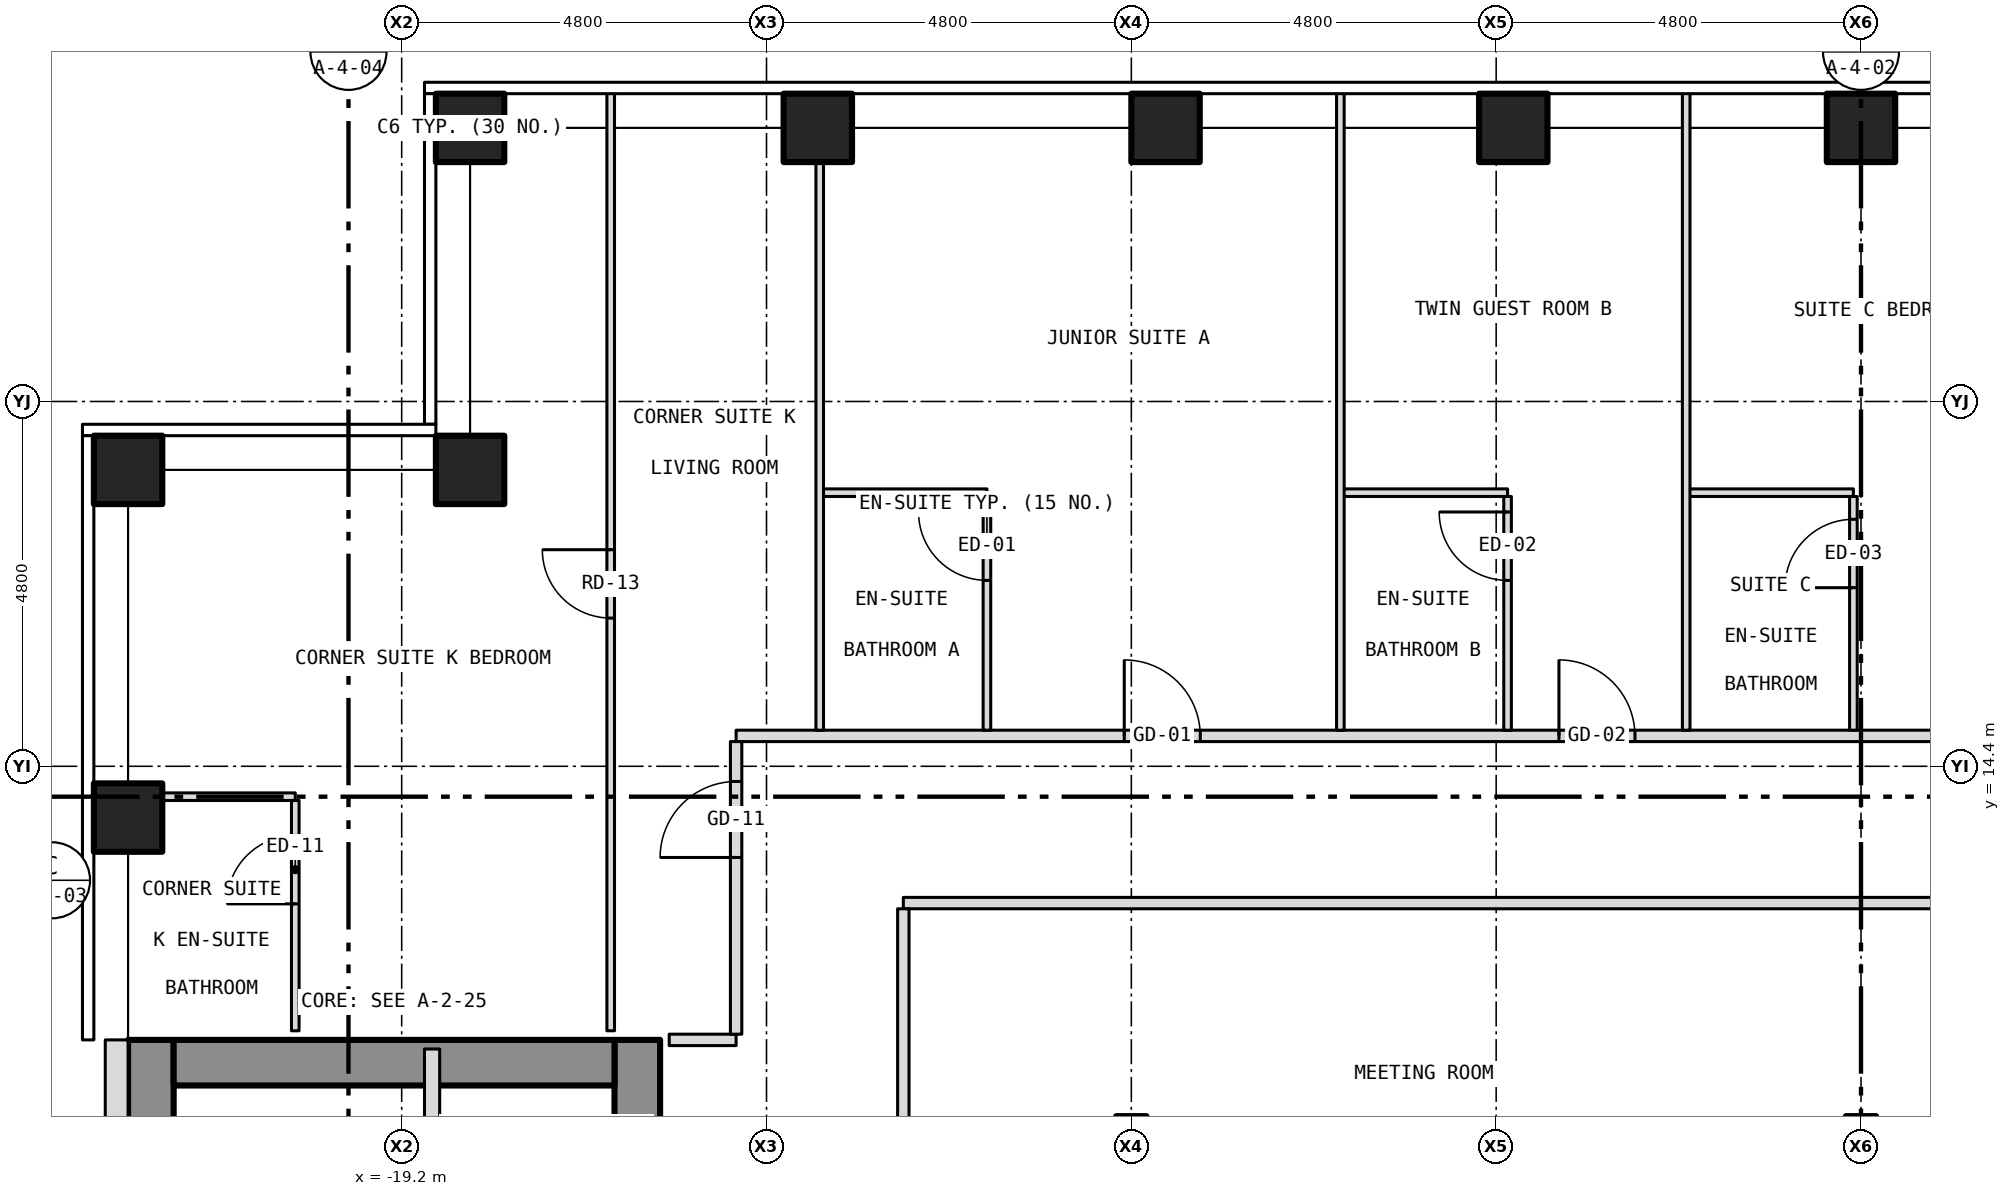
"""IFC4 building model, lengths in metres.
Left out: names, types, materials, properties, quantities, classifications, styles, units other than length and angle.
Written with IfcOpenShell. Run it as: python <this file> out.ifc"""

import sys

from ifc_helpers import new_model, si_unit, direction, frame, frame_2d, origin, origin_2d, place, context, subcontext, project, spatial, rectangle, hollow_rectangle, extrude, element, fill, save


model = new_model("IFC4")
c1 = context("Model", 3, precision=1e-05, world=origin(), true_north=direction((0.0, 1.0)))
c2 = subcontext(c1, "Body", "Model", "MODEL_VIEW")
j1 = project(units=[si_unit("LENGTHUNIT", "METRE"), si_unit("PLANEANGLEUNIT", "RADIAN")], contexts=[c1])
p1 = place(None, origin())
s1 = spatial("IfcSite", under=j1, at=p1, CompositionType="ELEMENT")
p2 = place(p1, origin())
s2 = spatial("IfcBuilding", under=s1, at=p2, CompositionType="ELEMENT")
p3 = place(p2, frame((0.0, 0.0, 92.5)))
s3 = spatial("IfcBuildingStorey", under=s2, at=p3, CompositionType="ELEMENT", Elevation=92.5)
for number, where, z_axis, x_axis in (
    (1, (-18.3, 22.8, -0.15), (0.0, 0.0, 1.0), (1.0, 0.0, 0.0)),
    (2, (-13.725, 22.8, -0.15), (0.0, 0.0, 1.0), (1.0, 0.0, 0.0)),
    (3, (-9.15, 22.8, -0.15), (0.0, 0.0, 1.0), (1.0, 0.0, 0.0)),
    (4, (-4.575, 22.8, -0.15), (0.0, 0.0, 1.0), (1.0, 0.0, 0.0)),
    (5, (0.0, 22.8, -0.15), (0.0, 0.0, 1.0), (1.0, 0.0, 0.0)),
    (6, (-22.8, 13.725, -0.15), (0.0, 0.0, 1.0), (1.0, 0.0, 0.0)),
    (7, (-22.8, 18.3, -0.15), (0.0, 0.0, 1.0), (1.0, 0.0, 0.0)),
    (8, (-18.3, 18.3, -0.15), (0.0, 0.0, 1.0), (1.0, 0.0, 0.0)),
):
    element("IfcColumn", number, at=place(p3, frame(where, z_axis=z_axis, x_axis=x_axis)), inside=s3, PredefinedType="COLUMN", context=c2, shape_type="SweptSolid", body=[
        extrude(hollow_rectangle(XDim=0.9, YDim=0.9, WallThickness=0.05, at=origin_2d()), origin(), (0.0, 0.0, 1.0), 3.5),
    ])
p4 = place(p3, frame((-16.1, -10.8, 0.0), z_axis=(0.0, 0.0, 1.0), x_axis=(0.0, 1.0, 0.0)))
e9 = element("IfcWall", 9, at=p4, inside=s3, PredefinedType="SHEAR", context=c2, shape_type="SweptSolid", body=[
    extrude(rectangle(XDim=21.6, YDim=0.6, at=frame_2d((10.8, 0.0))), origin(), (0.0, 0.0, 1.0), 3.25),
])
p5 = place(p4, frame((9.4, 0.0, 0.0)))
e10 = element("IfcOpeningElement", 10, at=p5, cuts=e9, PredefinedType="OPENING", context=c2, shape_type="SweptSolid", body=[
    extrude(rectangle(XDim=1.1, YDim=2.1, at=frame_2d((0.55, 1.05))), frame((0.0, 0.312, 0.0), z_axis=(0.0, -1.0, 0.0), x_axis=(1.0, 0.0, 0.0)), (0.0, 0.0, 1.0), 0.624),
])
p6 = place(p4, frame((11.5, 0.0, 0.0)))
e11 = element("IfcOpeningElement", 11, at=p6, cuts=e9, PredefinedType="OPENING", context=c2, shape_type="SweptSolid", body=[
    extrude(rectangle(XDim=1.1, YDim=2.1, at=frame_2d((0.55, 1.05))), frame((0.0, 0.312, 0.0), z_axis=(0.0, -1.0, 0.0), x_axis=(1.0, 0.0, 0.0)), (0.0, 0.0, 1.0), 0.624),
])
p7 = place(p4, frame((13.6, 0.0, 0.0)))
e12 = element("IfcOpeningElement", 12, at=p7, cuts=e9, PredefinedType="OPENING", context=c2, shape_type="SweptSolid", body=[
    extrude(rectangle(XDim=1.1, YDim=2.1, at=frame_2d((0.55, 1.05))), frame((0.0, 0.312, 0.0), z_axis=(0.0, -1.0, 0.0), x_axis=(1.0, 0.0, 0.0)), (0.0, 0.0, 1.0), 0.624),
])
p8 = place(p4, frame((15.7, 0.0, 0.0)))
e13 = element("IfcOpeningElement", 13, at=p8, cuts=e9, PredefinedType="OPENING", context=c2, shape_type="SweptSolid", body=[
    extrude(rectangle(XDim=1.1, YDim=2.1, at=frame_2d((0.55, 1.05))), frame((0.0, 0.312, 0.0), z_axis=(0.0, -1.0, 0.0), x_axis=(1.0, 0.0, 0.0)), (0.0, 0.0, 1.0), 0.624),
])
p9 = place(p4, frame((17.8, 0.0, 0.0)))
e14 = element("IfcOpeningElement", 14, at=p9, cuts=e9, PredefinedType="OPENING", context=c2, shape_type="SweptSolid", body=[
    extrude(rectangle(XDim=1.1, YDim=2.1, at=frame_2d((0.55, 1.05))), frame((0.0, 0.312, 0.0), z_axis=(0.0, -1.0, 0.0), x_axis=(1.0, 0.0, 0.0)), (0.0, 0.0, 1.0), 0.624),
])
p10 = place(p4, frame((0.758, 0.0, 0.0)))
e15 = element("IfcOpeningElement", 15, at=p10, cuts=e9, PredefinedType="OPENING", context=c2, shape_type="SweptSolid", body=[
    extrude(rectangle(XDim=1.1, YDim=2.1, at=frame_2d((0.55, 1.05))), frame((0.0, 0.312, 0.0), z_axis=(0.0, -1.0, 0.0), x_axis=(1.0, 0.0, 0.0)), (0.0, 0.0, 1.0), 0.624),
])
p11 = place(p4, frame((7.5, 0.0, 0.0)))
e16 = element("IfcOpeningElement", 16, at=p11, cuts=e9, PredefinedType="OPENING", context=c2, shape_type="SweptSolid", body=[
    extrude(rectangle(XDim=1.1, YDim=2.1, at=frame_2d((0.55, 1.05))), frame((0.0, 0.312, 0.0), z_axis=(0.0, -1.0, 0.0), x_axis=(1.0, 0.0, 0.0)), (0.0, 0.0, 1.0), 0.624),
])
p12 = place(p3, frame((-22.5, -10.8, 0.0), z_axis=(0.0, 0.0, 1.0), x_axis=(0.0, 1.0, 0.0)))
e17 = element("IfcWall", 17, at=p12, inside=s3, PredefinedType="SHEAR", context=c2, shape_type="SweptSolid", body=[
    extrude(rectangle(XDim=21.6, YDim=0.6, at=frame_2d((10.8, 0.0))), origin(), (0.0, 0.0, 1.0), 3.25),
])
p13 = place(p3, frame((-22.2, 10.5, 0.0), z_axis=(0.0, 0.0, 1.0), x_axis=(1.0, 0.0, 0.0)))
e18 = element("IfcWall", 18, at=p13, inside=s3, PredefinedType="SHEAR", context=c2, shape_type="SweptSolid", body=[
    extrude(rectangle(XDim=5.8, YDim=0.6, at=frame_2d((2.9, 0.0))), origin(), (0.0, 0.0, 1.0), 3.25),
])
p14 = place(p3, frame((-22.95, 10.8, 0.0), z_axis=(0.0, 0.0, 1.0), x_axis=(0.0, -1.0, 0.0)))
e19 = element("IfcWall", 19, at=p14, inside=s3, PredefinedType="SOLIDWALL", context=c2, shape_type="SweptSolid", body=[
    extrude(rectangle(XDim=21.6, YDim=0.3, at=frame_2d((10.8, 0.0))), origin(), (0.0, 0.0, 1.0), 3.5),
])
p15 = place(p14, frame((18.05, 0.0, 1.0)))
e20 = element("IfcOpeningElement", 20, at=p15, cuts=e19, PredefinedType="OPENING", context=c2, shape_type="SweptSolid", body=[
    extrude(rectangle(XDim=0.6, YDim=1.5, at=frame_2d((0.3, 0.75))), frame((0.0, 0.162, 0.0), z_axis=(0.0, -1.0, 0.0), x_axis=(1.0, 0.0, 0.0)), (0.0, 0.0, 1.0), 0.324),
])
p16 = place(p3, frame((-15.68, 10.8, 0.0), z_axis=(0.0, 0.0, 1.0), x_axis=(1.0, 0.0, 0.0)))
e21 = element("IfcWall", 21, at=p16, inside=s3, PredefinedType="PARTITIONING", context=c2, shape_type="SweptSolid", body=[
    extrude(rectangle(XDim=0.88, YDim=0.15, at=frame_2d((0.44, 0.0))), origin(), (0.0, 0.0, 1.0), 3.35),
])
p17 = place(p3, frame((-12.6, 12.6, 0.0), z_axis=(0.0, 0.0, 1.0), x_axis=(1.0, 0.0, 0.0)))
e22 = element("IfcWall", 22, at=p17, inside=s3, PredefinedType="PARTITIONING", context=c2, shape_type="SweptSolid", body=[
    extrude(rectangle(XDim=13.7, YDim=0.15, at=frame_2d((6.85, 0.0))), origin(), (0.0, 0.0, 1.0), 3.35),
])
p18 = place(p3, frame((-22.68, 14.0, 0.0), z_axis=(0.0, 0.0, 1.0), x_axis=(1.0, 0.0, 0.0)))
e23 = element("IfcWall", 23, at=p18, inside=s3, PredefinedType="PARTITIONING", context=c2, shape_type="SweptSolid", body=[
    extrude(rectangle(XDim=2.08, YDim=0.1, at=frame_2d((1.04, 0.0))), origin(), (0.0, 0.0, 1.0), 3.35),
])
p19 = place(p3, frame((-14.8, 14.8, 0.0), z_axis=(0.0, 0.0, 1.0), x_axis=(1.0, 0.0, 0.0)))
e24 = element("IfcWall", 24, at=p19, inside=s3, PredefinedType="PARTITIONING", context=c2, shape_type="SweptSolid", body=[
    extrude(rectangle(XDim=29.6, YDim=0.15, at=frame_2d((14.8, 0.0))), origin(), (0.0, 0.0, 1.0), 3.35),
])
p20 = place(p19, frame((5.107, 0.0, 0.0)))
e25 = element("IfcOpeningElement", 25, at=p20, cuts=e24, PredefinedType="OPENING", context=c2, shape_type="SweptSolid", body=[
    extrude(rectangle(XDim=1.0, YDim=2.1, at=frame_2d((0.5, 1.05))), frame((0.0, 0.087, 0.0), z_axis=(0.0, -1.0, 0.0), x_axis=(1.0, 0.0, 0.0)), (0.0, 0.0, 1.0), 0.174),
])
p21 = place(p19, frame((10.826, 0.0, 0.0)))
e26 = element("IfcOpeningElement", 26, at=p21, cuts=e24, PredefinedType="OPENING", context=c2, shape_type="SweptSolid", body=[
    extrude(rectangle(XDim=1.0, YDim=2.1, at=frame_2d((0.5, 1.05))), frame((0.0, 0.087, 0.0), z_axis=(0.0, -1.0, 0.0), x_axis=(1.0, 0.0, 0.0)), (0.0, 0.0, 1.0), 0.174),
])
p22 = place(p19, frame((19.104, 0.0, 0.0)))
e27 = element("IfcOpeningElement", 27, at=p22, cuts=e24, PredefinedType="OPENING", context=c2, shape_type="SweptSolid", body=[
    extrude(rectangle(XDim=1.0, YDim=2.1, at=frame_2d((0.5, 1.05))), frame((0.0, 0.087, 0.0), z_axis=(0.0, -1.0, 0.0), x_axis=(1.0, 0.0, 0.0)), (0.0, 0.0, 1.0), 0.174),
])
p23 = place(p19, frame((25.694, 0.0, 0.0)))
e28 = element("IfcOpeningElement", 28, at=p23, cuts=e24, PredefinedType="OPENING", context=c2, shape_type="SweptSolid", body=[
    extrude(rectangle(XDim=1.0, YDim=2.1, at=frame_2d((0.5, 1.05))), frame((0.0, 0.087, 0.0), z_axis=(0.0, -1.0, 0.0), x_axis=(1.0, 0.0, 0.0)), (0.0, 0.0, 1.0), 0.174),
])
p24 = place(p3, frame((-13.7, 18.0, 0.0), z_axis=(0.0, 0.0, 1.0), x_axis=(1.0, 0.0, 0.0)))
e29 = element("IfcWall", 29, at=p24, inside=s3, PredefinedType="PARTITIONING", context=c2, shape_type="SweptSolid", body=[
    extrude(rectangle(XDim=2.2, YDim=0.1, at=frame_2d((1.1, 0.0))), origin(), (0.0, 0.0, 1.0), 3.35),
])
p25 = place(p3, frame((-6.85, 18.0, 0.0), z_axis=(0.0, 0.0, 1.0), x_axis=(1.0, 0.0, 0.0)))
e30 = element("IfcWall", 30, at=p25, inside=s3, PredefinedType="PARTITIONING", context=c2, shape_type="SweptSolid", body=[
    extrude(rectangle(XDim=2.2, YDim=0.1, at=frame_2d((1.1, 0.0))), origin(), (0.0, 0.0, 1.0), 3.35),
])
p26 = place(p3, frame((-2.3, 18.0, 0.0), z_axis=(0.0, 0.0, 1.0), x_axis=(1.0, 0.0, 0.0)))
e31 = element("IfcWall", 31, at=p26, inside=s3, PredefinedType="PARTITIONING", context=c2, shape_type="SweptSolid", body=[
    extrude(rectangle(XDim=2.2, YDim=0.1, at=frame_2d((1.1, 0.0))), origin(), (0.0, 0.0, 1.0), 3.35),
])
p27 = place(p3, frame((-20.6, 10.92, 0.0), z_axis=(0.0, 0.0, 1.0), x_axis=(0.0, 1.0, 0.0)))
e32 = element("IfcWall", 32, at=p27, inside=s3, PredefinedType="PARTITIONING", context=c2, shape_type="SweptSolid", body=[
    extrude(rectangle(XDim=3.03, YDim=0.1, at=frame_2d((1.515, 0.0))), origin(), (0.0, 0.0, 1.0), 3.35),
])
p28 = place(p27, frame((1.67, 0.0, 0.0)))
e33 = element("IfcOpeningElement", 33, at=p28, cuts=e32, PredefinedType="OPENING", context=c2, shape_type="SweptSolid", body=[
    extrude(rectangle(XDim=0.9, YDim=2.1, at=frame_2d((0.45, 1.05))), frame((0.0, 0.062, 0.0), z_axis=(0.0, -1.0, 0.0), x_axis=(1.0, 0.0, 0.0)), (0.0, 0.0, 1.0), 0.124),
])
p29 = place(p3, frame((-18.8, 4.45, 0.0), z_axis=(0.0, 0.0, 1.0), x_axis=(0.0, 1.0, 0.0)))
e34 = element("IfcWall", 34, at=p29, inside=s3, PredefinedType="PARTITIONING", context=c2, shape_type="SweptSolid", body=[
    extrude(rectangle(XDim=6.23, YDim=0.2, at=frame_2d((3.115, 0.0))), origin(), (0.0, 0.0, 1.0), 3.25),
])
p30 = place(p3, frame((-16.45, 10.92, 0.0), z_axis=(0.0, 0.0, 1.0), x_axis=(0.0, 1.0, 0.0)))
e35 = element("IfcWall", 35, at=p30, inside=s3, PredefinedType="PARTITIONING", context=c2, shape_type="SweptSolid", body=[
    extrude(rectangle(XDim=12.36, YDim=0.1, at=frame_2d((6.18, 0.0))), origin(), (0.0, 0.0, 1.0), 3.35),
])
p31 = place(p30, frame((5.43, 0.0, 0.0)))
e36 = element("IfcOpeningElement", 36, at=p31, cuts=e35, PredefinedType="OPENING", context=c2, shape_type="SweptSolid", body=[
    extrude(rectangle(XDim=0.9, YDim=2.1, at=frame_2d((0.45, 1.05))), frame((0.0, 0.062, 0.0), z_axis=(0.0, -1.0, 0.0), x_axis=(1.0, 0.0, 0.0)), (0.0, 0.0, 1.0), 0.124),
])
p32 = place(p3, frame((-14.8, 10.875, 0.0), z_axis=(0.0, 0.0, 1.0), x_axis=(0.0, 1.0, 0.0)))
e37 = element("IfcWall", 37, at=p32, inside=s3, PredefinedType="PARTITIONING", context=c2, shape_type="SweptSolid", body=[
    extrude(rectangle(XDim=3.85, YDim=0.15, at=frame_2d((1.925, 0.0))), origin(), (0.0, 0.0, 1.0), 3.35),
])
p33 = place(p32, frame((2.325, 0.0, 0.0)))
e38 = element("IfcOpeningElement", 38, at=p33, cuts=e37, PredefinedType="OPENING", context=c2, shape_type="SweptSolid", body=[
    extrude(rectangle(XDim=1.0, YDim=2.1, at=frame_2d((0.5, 1.05))), frame((0.0, 0.087, 0.0), z_axis=(0.0, -1.0, 0.0), x_axis=(1.0, 0.0, 0.0)), (0.0, 0.0, 1.0), 0.174),
])
p34 = place(p3, frame((-13.7, 14.875, 0.0), z_axis=(0.0, 0.0, 1.0), x_axis=(0.0, 1.0, 0.0)))
e39 = element("IfcWall", 39, at=p34, inside=s3, PredefinedType="PARTITIONING", context=c2, shape_type="SweptSolid", body=[
    extrude(rectangle(XDim=7.805, YDim=0.1, at=frame_2d((3.902, 0.0))), origin(), (0.0, 0.0, 1.0), 3.35),
])
p35 = place(p3, frame((-12.6, 8.175, 0.0), z_axis=(0.0, 0.0, 1.0), x_axis=(0.0, 1.0, 0.0)))
e40 = element("IfcWall", 40, at=p35, inside=s3, PredefinedType="PARTITIONING", context=c2, shape_type="SweptSolid", body=[
    extrude(rectangle(XDim=4.35, YDim=0.15, at=frame_2d((2.175, 0.0))), origin(), (0.0, 0.0, 1.0), 3.35),
])
p36 = place(p3, frame((-11.5, 14.875, 0.0), z_axis=(0.0, 0.0, 1.0), x_axis=(0.0, 1.0, 0.0)))
e41 = element("IfcWall", 41, at=p36, inside=s3, PredefinedType="PARTITIONING", context=c2, shape_type="SweptSolid", body=[
    extrude(rectangle(XDim=3.075, YDim=0.1, at=frame_2d((1.538, 0.0))), origin(), (0.0, 0.0, 1.0), 3.35),
])
p37 = place(p36, frame((1.971, 0.0, 0.0)))
e42 = element("IfcOpeningElement", 42, at=p37, cuts=e41, PredefinedType="OPENING", context=c2, shape_type="SweptSolid", body=[
    extrude(rectangle(XDim=0.9, YDim=2.1, at=frame_2d((0.45, 1.05))), frame((0.0, 0.062, 0.0), z_axis=(0.0, -1.0, 0.0), x_axis=(1.0, 0.0, 0.0)), (0.0, 0.0, 1.0), 0.124),
])
p38 = place(p3, frame((-6.85, 14.875, 0.0), z_axis=(0.0, 0.0, 1.0), x_axis=(0.0, 1.0, 0.0)))
e43 = element("IfcWall", 43, at=p38, inside=s3, PredefinedType="PARTITIONING", context=c2, shape_type="SweptSolid", body=[
    extrude(rectangle(XDim=8.405, YDim=0.1, at=frame_2d((4.203, 0.0))), origin(), (0.0, 0.0, 1.0), 3.35),
])
p39 = place(p3, frame((-4.65, 14.875, 0.0), z_axis=(0.0, 0.0, 1.0), x_axis=(0.0, 1.0, 0.0)))
e44 = element("IfcWall", 44, at=p39, inside=s3, PredefinedType="PARTITIONING", context=c2, shape_type="SweptSolid", body=[
    extrude(rectangle(XDim=3.075, YDim=0.1, at=frame_2d((1.538, 0.0))), origin(), (0.0, 0.0, 1.0), 2.817),
])
p40 = place(p39, frame((1.971, 0.0, 0.0)))
e45 = element("IfcOpeningElement", 45, at=p40, cuts=e44, PredefinedType="OPENING", context=c2, shape_type="SweptSolid", body=[
    extrude(rectangle(XDim=0.9, YDim=2.1, at=frame_2d((0.45, 1.05))), frame((0.0, 0.062, 0.0), z_axis=(0.0, -1.0, 0.0), x_axis=(1.0, 0.0, 0.0)), (0.0, 0.0, 1.0), 0.124),
])
p41 = place(p3, frame((-2.3, 14.875, 0.0), z_axis=(0.0, 0.0, 1.0), x_axis=(0.0, 1.0, 0.0)))
e46 = element("IfcWall", 46, at=p41, inside=s3, PredefinedType="PARTITIONING", context=c2, shape_type="SweptSolid", body=[
    extrude(rectangle(XDim=8.405, YDim=0.1, at=frame_2d((4.203, 0.0))), origin(), (0.0, 0.0, 1.0), 3.35),
])
p42 = place(p3, frame((-0.1, 14.875, 0.0), z_axis=(0.0, 0.0, 1.0), x_axis=(0.0, 1.0, 0.0)))
e47 = element("IfcWall", 47, at=p42, inside=s3, PredefinedType="PARTITIONING", context=c2, shape_type="SweptSolid", body=[
    extrude(rectangle(XDim=3.075, YDim=0.1, at=frame_2d((1.538, 0.0))), origin(), (0.0, 0.0, 1.0), 2.728),
])
p43 = place(p42, frame((1.875, 0.0, 0.0)))
e48 = element("IfcOpeningElement", 48, at=p43, cuts=e47, PredefinedType="OPENING", context=c2, shape_type="SweptSolid", body=[
    extrude(rectangle(XDim=0.9, YDim=2.1, at=frame_2d((0.45, 1.05))), frame((0.0, 0.062, 0.0), z_axis=(0.0, -1.0, 0.0), x_axis=(1.0, 0.0, 0.0)), (0.0, 0.0, 1.0), 0.124),
])
p44 = place(p20, origin())
e49 = element("IfcDoor", 49, at=p44, inside=s3, OperationType="SINGLE_SWING_LEFT", PredefinedType="DOOR", context=c2, shape_type="SweptSolid", body=[
    extrude(rectangle(XDim=1.0, YDim=2.1, at=frame_2d((0.5, 1.05))), frame((0.0, 0.025, 0.0), z_axis=(0.0, -1.0, 0.0), x_axis=(1.0, 0.0, 0.0)), (0.0, 0.0, 1.0), 0.05),
])
fill(e25, e49)
p45 = place(p37, origin())
e50 = element("IfcDoor", 50, at=p45, inside=s3, OperationType="SINGLE_SWING_RIGHT", PredefinedType="DOOR", context=c2, shape_type="SweptSolid", body=[
    extrude(rectangle(XDim=0.9, YDim=2.1, at=frame_2d((0.45, 1.05))), frame((0.0, 0.025, 0.0), z_axis=(0.0, -1.0, 0.0), x_axis=(1.0, 0.0, 0.0)), (0.0, 0.0, 1.0), 0.05),
])
fill(e42, e50)
p46 = place(p21, origin())
e51 = element("IfcDoor", 51, at=p46, inside=s3, OperationType="SINGLE_SWING_LEFT", PredefinedType="DOOR", context=c2, shape_type="SweptSolid", body=[
    extrude(rectangle(XDim=1.0, YDim=2.1, at=frame_2d((0.5, 1.05))), frame((0.0, 0.025, 0.0), z_axis=(0.0, -1.0, 0.0), x_axis=(1.0, 0.0, 0.0)), (0.0, 0.0, 1.0), 0.05),
])
fill(e26, e51)
p47 = place(p40, origin())
e52 = element("IfcDoor", 52, at=p47, inside=s3, OperationType="SINGLE_SWING_RIGHT", PredefinedType="DOOR", context=c2, shape_type="SweptSolid", body=[
    extrude(rectangle(XDim=0.9, YDim=2.1, at=frame_2d((0.45, 1.05))), frame((0.0, 0.025, 0.0), z_axis=(0.0, -1.0, 0.0), x_axis=(1.0, 0.0, 0.0)), (0.0, 0.0, 1.0), 0.05),
])
fill(e45, e52)
p48 = place(p43, origin())
e53 = element("IfcDoor", 53, at=p48, inside=s3, OperationType="SINGLE_SWING_LEFT", PredefinedType="DOOR", context=c2, shape_type="SweptSolid", body=[
    extrude(rectangle(XDim=0.9, YDim=2.1, at=frame_2d((0.45, 1.05))), frame((0.0, 0.025, 0.0), z_axis=(0.0, -1.0, 0.0), x_axis=(1.0, 0.0, 0.0)), (0.0, 0.0, 1.0), 0.05),
])
fill(e48, e53)
p49 = place(p33, origin())
e54 = element("IfcDoor", 54, at=p49, inside=s3, OperationType="SINGLE_SWING_LEFT", PredefinedType="DOOR", context=c2, shape_type="SweptSolid", body=[
    extrude(rectangle(XDim=1.0, YDim=2.1, at=frame_2d((0.5, 1.05))), frame((0.0, 0.025, 0.0), z_axis=(0.0, -1.0, 0.0), x_axis=(1.0, 0.0, 0.0)), (0.0, 0.0, 1.0), 0.05),
])
fill(e38, e54)
p50 = place(p31, origin())
e55 = element("IfcDoor", 55, at=p50, inside=s3, OperationType="SINGLE_SWING_RIGHT", PredefinedType="DOOR", context=c2, shape_type="SweptSolid", body=[
    extrude(rectangle(XDim=0.9, YDim=2.1, at=frame_2d((0.45, 1.05))), frame((0.0, 0.025, 0.0), z_axis=(0.0, -1.0, 0.0), x_axis=(1.0, 0.0, 0.0)), (0.0, 0.0, 1.0), 0.05),
])
fill(e36, e55)
p51 = place(p28, origin())
e56 = element("IfcDoor", 56, at=p51, inside=s3, OperationType="SINGLE_SWING_LEFT", PredefinedType="DOOR", context=c2, shape_type="SweptSolid", body=[
    extrude(rectangle(XDim=0.9, YDim=2.1, at=frame_2d((0.45, 1.05))), frame((0.0, 0.025, 0.0), z_axis=(0.0, -1.0, 0.0), x_axis=(1.0, 0.0, 0.0)), (0.0, 0.0, 1.0), 0.05),
])
fill(e33, e56)
save(model, sys.argv[1])
